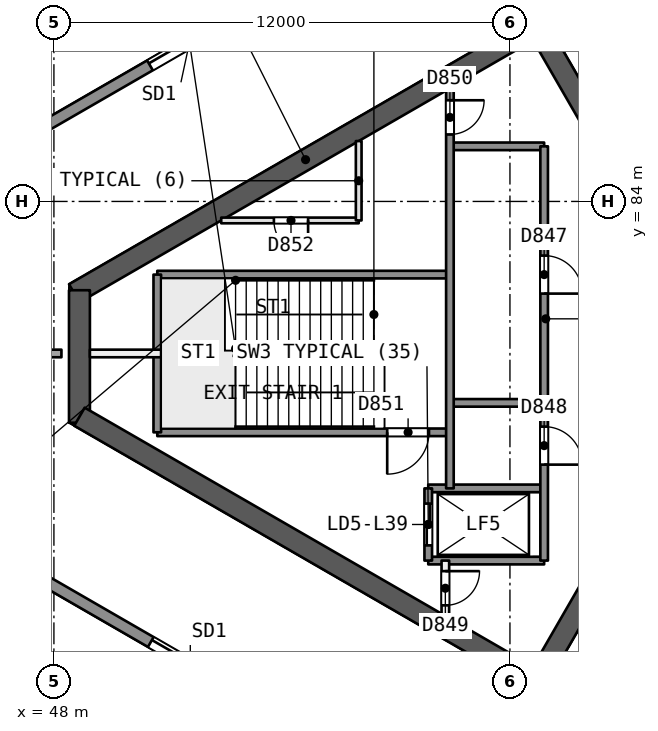
"""IFC4 building model, lengths in metres.
Left out: names, types, materials, properties, quantities, classifications, styles, units other than length and angle.
Written with IfcOpenShell. Run it as: python <this file> out.ifc"""

import sys

from ifc_helpers import new_model, si_unit, direction, frame, frame_2d, origin, place, context, subcontext, project, spatial, rectangle, extrude, element, fill, save


model = new_model("IFC4")
c1 = context("Model", 3, precision=1e-05, world=origin(), true_north=direction((0.0, 1.0)))
c2 = subcontext(c1, "Body", "Model", "MODEL_VIEW")
j1 = project(units=[si_unit("LENGTHUNIT", "METRE"), si_unit("PLANEANGLEUNIT", "RADIAN")], contexts=[c1])
p1 = place(None, origin())
s1 = spatial("IfcSite", under=j1, at=p1, CompositionType="ELEMENT")
p2 = place(p1, origin())
s2 = spatial("IfcBuilding", under=s1, at=p2, CompositionType="ELEMENT")
p3 = place(p2, frame((0.0, 0.0, 163.7)))
s3 = spatial("IfcBuildingStorey", under=s2, at=p3, CompositionType="ELEMENT", Elevation=163.7)
p4 = place(p3, frame((65.682, 80.0, 0.0), z_axis=(0.0, 0.0, 1.0), x_axis=(-0.500000202252, 0.866025287014, 0.0)))
e1 = element("IfcWall", 1, at=p4, inside=s3, PredefinedType="SHEAR", context=c2, shape_type="SweptSolid", body=[
    extrude(rectangle(XDim=10.221, YDim=0.55, at=frame_2d((5.111, 0.0))), origin(), (0.0, 0.0, 1.0), 3.7),
])
p5 = place(p4, frame((0.791, 0.0, 0.0)))
e2 = element("IfcOpeningElement", 2, at=p5, cuts=e1, PredefinedType="OPENING", context=c2, shape_type="SweptSolid", body=[
    extrude(rectangle(XDim=1.2, YDim=2.1, at=frame_2d((0.6, 1.05))), frame((0.0, 0.286, 0.0), z_axis=(0.0, -1.0, 0.0), x_axis=(1.0, 0.0, 0.0)), (0.0, 0.0, 1.0), 0.571),
])
p6 = place(p3, frame((60.709, 88.614, 0.0), z_axis=(0.0, 0.0, 1.0), x_axis=(-0.866020164116, -0.500009075263, 0.0)))
e3 = element("IfcWall", 3, at=p6, inside=s3, PredefinedType="SHEAR", context=c2, shape_type="SweptSolid", body=[
    extrude(rectangle(XDim=14.058, YDim=0.55, at=frame_2d((7.029, 0.0))), origin(), (0.0, 0.0, 1.0), 3.7),
])
p7 = place(p3, frame((48.672, 81.664, 0.0), z_axis=(0.0, 0.0, 1.0), x_axis=(0.0, -1.0, 0.0)))
e4 = element("IfcWall", 4, at=p7, inside=s3, PredefinedType="SHEAR", context=c2, shape_type="SweptSolid", body=[
    extrude(rectangle(XDim=3.487, YDim=0.55, at=frame_2d((1.743, 0.0))), origin(), (0.0, 0.0, 1.0), 3.7),
])
p8 = place(p3, frame((48.672, 78.336, 0.0), z_axis=(0.0, 0.0, 1.0), x_axis=(0.866023530946, -0.500003243837, 0.0)))
e5 = element("IfcWall", 5, at=p8, inside=s3, PredefinedType="SHEAR", context=c2, shape_type="SweptSolid", body=[
    extrude(rectangle(XDim=14.175, YDim=0.55, at=frame_2d((7.087, 0.0))), origin(), (0.0, 0.0, 1.0), 3.7),
])
p9 = place(p3, frame((60.709, 71.386, 0.0), z_axis=(0.0, 0.0, 1.0), x_axis=(0.500015938302, 0.866016201606, 0.0)))
e6 = element("IfcWall", 6, at=p9, inside=s3, PredefinedType="SHEAR", context=c2, shape_type="SweptSolid", body=[
    extrude(rectangle(XDim=10.105, YDim=0.55, at=frame_2d((5.053, 0.0))), origin(), (0.0, 0.0, 1.0), 3.7),
])
p10 = place(p9, frame((7.955, 0.0, 0.0)))
e7 = element("IfcOpeningElement", 7, at=p10, cuts=e6, PredefinedType="OPENING", context=c2, shape_type="SweptSolid", body=[
    extrude(rectangle(XDim=1.2, YDim=2.1, at=frame_2d((0.6, 1.05))), frame((0.0, 0.286, 0.0), z_axis=(0.0, -1.0, 0.0), x_axis=(1.0, 0.0, 0.0)), (0.0, 0.0, 1.0), 0.571),
])
p11 = place(p3, frame((66.129, 83.077, 0.0), z_axis=(0.0, 0.0, 1.0), x_axis=(-0.5000018851, 0.866024315419, 0.0)))
e8 = element("IfcWall", 8, at=p11, inside=s3, PredefinedType="PARTITIONING", context=c2, shape_type="SweptSolid", body=[
    extrude(rectangle(XDim=9.0, YDim=0.2, at=frame_2d((4.5, 0.0))), origin(), (0.0, 0.0, 1.0), 3.25),
])
p12 = place(p3, frame((42.338, 80.0, 0.0), z_axis=(0.0, 0.0, 1.0), x_axis=(1.0, 0.0, 0.0)))
e9 = element("IfcWall", 9, at=p12, inside=s3, PredefinedType="PARTITIONING", context=c2, shape_type="SweptSolid", body=[
    extrude(rectangle(XDim=5.86, YDim=0.2, at=frame_2d((2.93, 0.0))), origin(), (0.0, 0.0, 1.0), 3.25),
])
p13 = place(p3, frame((42.189, 82.766, 0.0), z_axis=(0.0, 0.0, 1.0), x_axis=(0.866025862562, 0.499999205373, 0.0)))
e10 = element("IfcWall", 10, at=p13, inside=s3, PredefinedType="SOLIDWALL", context=c2, shape_type="SweptSolid", body=[
    extrude(rectangle(XDim=54.064, YDim=0.3, at=frame_2d((27.032, 0.0))), origin(), (0.0, 0.0, 1.0), 3.25),
])
p14 = place(p13, frame((20.688, 0.0, 0.0)))
e11 = element("IfcOpeningElement", 11, at=p14, cuts=e10, PredefinedType="OPENING", context=c2, shape_type="SweptSolid", body=[
    extrude(rectangle(XDim=2.4, YDim=2.4, at=frame_2d((1.2, 1.2))), frame((0.0, 0.161, 0.0), z_axis=(0.0, -1.0, 0.0), x_axis=(1.0, 0.0, 0.0)), (0.0, 0.0, 1.0), 0.321),
])
p15 = place(p13, frame((9.629, 0.0, 0.0)))
e12 = element("IfcOpeningElement", 12, at=p15, cuts=e10, PredefinedType="OPENING", context=c2, shape_type="SweptSolid", body=[
    extrude(rectangle(XDim=2.4, YDim=2.4, at=frame_2d((1.2, 1.2))), frame((0.0, 0.161, 0.0), z_axis=(0.0, -1.0, 0.0), x_axis=(1.0, 0.0, 0.0)), (0.0, 0.0, 1.0), 0.321),
])
p16 = place(p13, frame((40.951, 0.0, 0.0)))
e13 = element("IfcOpeningElement", 13, at=p16, cuts=e10, PredefinedType="OPENING", context=c2, shape_type="SweptSolid", body=[
    extrude(rectangle(XDim=2.4, YDim=2.4, at=frame_2d((1.2, 1.2))), frame((0.0, 0.161, 0.0), z_axis=(0.0, -1.0, 0.0), x_axis=(1.0, 0.0, 0.0)), (0.0, 0.0, 1.0), 0.321),
])
p17 = place(p13, frame((27.847, 0.0, 0.9)))
e14 = element("IfcOpeningElement", 14, at=p17, cuts=e10, PredefinedType="OPENING", context=c2, shape_type="SweptSolid", body=[
    extrude(rectangle(XDim=1.8, YDim=1.5, at=frame_2d((0.9, 0.75))), frame((0.0, 0.161, 0.0), z_axis=(0.0, -1.0, 0.0), x_axis=(1.0, 0.0, 0.0)), (0.0, 0.0, 1.0), 0.321),
])
p18 = place(p13, frame((25.041, 0.0, 0.9)))
e15 = element("IfcOpeningElement", 15, at=p18, cuts=e10, PredefinedType="OPENING", context=c2, shape_type="SweptSolid", body=[
    extrude(rectangle(XDim=1.8, YDim=1.5, at=frame_2d((0.9, 0.75))), frame((0.0, 0.161, 0.0), z_axis=(0.0, -1.0, 0.0), x_axis=(1.0, 0.0, 0.0)), (0.0, 0.0, 1.0), 0.321),
])
p19 = place(p3, frame((89.01, 50.202, 0.0), z_axis=(0.0, 0.0, 1.0), x_axis=(-0.866025862562, 0.499999205373, 0.0)))
e16 = element("IfcWall", 16, at=p19, inside=s3, PredefinedType="SOLIDWALL", context=c2, shape_type="SweptSolid", body=[
    extrude(rectangle(XDim=54.064, YDim=0.3, at=frame_2d((27.032, 0.0))), origin(), (0.0, 0.0, 1.0), 3.25),
])
p20 = place(p19, frame((30.665, 0.0, 0.0)))
e17 = element("IfcOpeningElement", 17, at=p20, cuts=e16, PredefinedType="OPENING", context=c2, shape_type="SweptSolid", body=[
    extrude(rectangle(XDim=2.4, YDim=2.4, at=frame_2d((1.2, 1.2))), frame((0.0, 0.161, 0.0), z_axis=(0.0, -1.0, 0.0), x_axis=(1.0, 0.0, 0.0)), (0.0, 0.0, 1.0), 0.321),
])
p21 = place(p19, frame((42.011, 0.0, 0.0)))
e18 = element("IfcOpeningElement", 18, at=p21, cuts=e16, PredefinedType="OPENING", context=c2, shape_type="SweptSolid", body=[
    extrude(rectangle(XDim=2.4, YDim=2.4, at=frame_2d((1.2, 1.2))), frame((0.0, 0.161, 0.0), z_axis=(0.0, -1.0, 0.0), x_axis=(1.0, 0.0, 0.0)), (0.0, 0.0, 1.0), 0.321),
])
p22 = place(p19, frame((10.402, 0.0, 0.0)))
e19 = element("IfcOpeningElement", 19, at=p22, cuts=e16, PredefinedType="OPENING", context=c2, shape_type="SweptSolid", body=[
    extrude(rectangle(XDim=2.4, YDim=2.4, at=frame_2d((1.2, 1.2))), frame((0.0, 0.161, 0.0), z_axis=(0.0, -1.0, 0.0), x_axis=(1.0, 0.0, 0.0)), (0.0, 0.0, 1.0), 0.321),
])
p23 = place(p19, frame((25.197, 0.0, 0.9)))
e20 = element("IfcOpeningElement", 20, at=p23, cuts=e16, PredefinedType="OPENING", context=c2, shape_type="SweptSolid", body=[
    extrude(rectangle(XDim=1.8, YDim=1.5, at=frame_2d((0.9, 0.75))), frame((0.0, 0.161, 0.0), z_axis=(0.0, -1.0, 0.0), x_axis=(1.0, 0.0, 0.0)), (0.0, 0.0, 1.0), 0.321),
])
p24 = place(p3, frame((60.9, 85.45, 0.0), z_axis=(0.0, 0.0, 1.0), x_axis=(-1.0, 0.0, 0.0)))
e21 = element("IfcWall", 21, at=p24, inside=s3, PredefinedType="SOLIDWALL", context=c2, shape_type="SweptSolid", body=[
    extrude(rectangle(XDim=2.48, YDim=0.2, at=frame_2d((1.24, 0.0))), origin(), (0.0, 0.0, 1.0), 3.25),
])
p25 = place(p3, frame((56.02, 83.5, 0.0), z_axis=(0.0, 0.0, 1.0), x_axis=(-1.0, 0.0, 0.0)))
e22 = element("IfcWall", 22, at=p25, inside=s3, PredefinedType="PARTITIONING", context=c2, shape_type="SweptSolid", body=[
    extrude(rectangle(XDim=3.618, YDim=0.15, at=frame_2d((1.809, 0.0))), origin(), (0.0, 0.0, 1.0), 3.25),
])
p26 = place(p25, frame((1.332, 0.0, 0.0)))
e23 = element("IfcOpeningElement", 23, at=p26, cuts=e22, PredefinedType="OPENING", context=c2, shape_type="SweptSolid", body=[
    extrude(rectangle(XDim=0.9, YDim=2.1, at=frame_2d((0.45, 1.05))), frame((0.0, 0.085, 0.0), z_axis=(0.0, -1.0, 0.0), x_axis=(1.0, 0.0, 0.0)), (0.0, 0.0, 1.0), 0.171),
])
p27 = place(p3, frame((58.42, 82.075, 0.0), z_axis=(0.0, 0.0, 1.0), x_axis=(-1.0, 0.0, 0.0)))
e24 = element("IfcWall", 24, at=p27, inside=s3, PredefinedType="SOLIDWALL", context=c2, shape_type="SweptSolid", body=[
    extrude(rectangle(XDim=7.7, YDim=0.2, at=frame_2d((3.85, 0.0))), origin(), (0.0, 0.0, 1.0), 3.25),
])
p28 = place(p3, frame((50.82, 80.0, 0.0), z_axis=(0.0, 0.0, 1.0), x_axis=(-1.0, 0.0, 0.0)))
e25 = element("IfcWall", 25, at=p28, inside=s3, PredefinedType="PARTITIONING", context=c2, shape_type="SweptSolid", body=[
    extrude(rectangle(XDim=1.873, YDim=0.2, at=frame_2d((0.937, 0.0))), origin(), (0.0, 0.0, 1.0), 3.25),
])
p29 = place(p3, frame((60.9, 78.7, 0.0), z_axis=(0.0, 0.0, 1.0), x_axis=(-1.0, 0.0, 0.0)))
e26 = element("IfcWall", 26, at=p29, inside=s3, PredefinedType="SOLIDWALL", context=c2, shape_type="SweptSolid", body=[
    extrude(rectangle(XDim=2.48, YDim=0.2, at=frame_2d((1.24, 0.0))), origin(), (0.0, 0.0, 1.0), 3.25),
])
p30 = place(p3, frame((58.42, 77.925, 0.0), z_axis=(0.0, 0.0, 1.0), x_axis=(-1.0, 0.0, 0.0)))
e27 = element("IfcWall", 27, at=p30, inside=s3, PredefinedType="SOLIDWALL", context=c2, shape_type="SweptSolid", body=[
    extrude(rectangle(XDim=7.7, YDim=0.2, at=frame_2d((3.85, 0.0))), origin(), (0.0, 0.0, 1.0), 3.25),
])
p31 = place(p30, frame((0.55, 0.0, 0.0)))
e28 = element("IfcOpeningElement", 28, at=p31, cuts=e27, PredefinedType="OPENING", context=c2, shape_type="SweptSolid", body=[
    extrude(rectangle(XDim=1.1, YDim=2.1, at=frame_2d((0.55, 1.05))), frame((0.0, 0.11, 0.0), z_axis=(0.0, -1.0, 0.0), x_axis=(1.0, 0.0, 0.0)), (0.0, 0.0, 1.0), 0.221),
])
for number, where, z_axis, x_axis in (
    (29, (60.9, 76.45, 0.0), (0.0, 0.0, 1.0), (-1.0, 0.0, 0.0)),
    (30, (60.9, 74.55, 0.0), (0.0, 0.0, 1.0), (-1.0, 0.0, 0.0)),
):
    element("IfcWall", number, at=place(p3, frame(where, z_axis=z_axis, x_axis=x_axis)), inside=s3, PredefinedType="SOLIDWALL", context=c2, shape_type="SweptSolid", body=[
        extrude(rectangle(XDim=3.05, YDim=0.2, at=frame_2d((1.525, 0.0))), origin(), (0.0, 0.0, 1.0), 3.25),
    ])
p32 = place(p3, frame((60.9, 85.45, 0.0), z_axis=(0.0, 0.0, 1.0), x_axis=(0.0, -1.0, 0.0)))
e31 = element("IfcWall", 31, at=p32, inside=s3, PredefinedType="SOLIDWALL", context=c2, shape_type="SweptSolid", body=[
    extrude(rectangle(XDim=10.9, YDim=0.2, at=frame_2d((5.45, 0.0))), origin(), (0.0, 0.0, 1.0), 3.25),
])
p33 = place(p32, frame((2.875, 0.0, 0.0)))
e32 = element("IfcOpeningElement", 32, at=p33, cuts=e31, PredefinedType="OPENING", context=c2, shape_type="SweptSolid", body=[
    extrude(rectangle(XDim=1.0, YDim=2.1, at=frame_2d((0.5, 1.05))), frame((0.0, 0.11, 0.0), z_axis=(0.0, -1.0, 0.0), x_axis=(1.0, 0.0, 0.0)), (0.0, 0.0, 1.0), 0.221),
])
p34 = place(p32, frame((7.375, 0.0, 0.0)))
e33 = element("IfcOpeningElement", 33, at=p34, cuts=e31, PredefinedType="OPENING", context=c2, shape_type="SweptSolid", body=[
    extrude(rectangle(XDim=1.0, YDim=2.1, at=frame_2d((0.5, 1.05))), frame((0.0, 0.11, 0.0), z_axis=(0.0, -1.0, 0.0), x_axis=(1.0, 0.0, 0.0)), (0.0, 0.0, 1.0), 0.221),
])
p35 = place(p3, frame((58.42, 86.974, 0.0), z_axis=(0.0, 0.0, 1.0), x_axis=(0.0, -1.0, 0.0)))
e34 = element("IfcWall", 34, at=p35, inside=s3, PredefinedType="SOLIDWALL", context=c2, shape_type="SweptSolid", body=[
    extrude(rectangle(XDim=10.524, YDim=0.2, at=frame_2d((5.262, 0.0))), origin(), (0.0, 0.0, 1.0), 3.25),
])
p36 = place(p35, frame((0.312, 0.0, 0.0)))
e35 = element("IfcOpeningElement", 35, at=p36, cuts=e34, PredefinedType="OPENING", context=c2, shape_type="SweptSolid", body=[
    extrude(rectangle(XDim=0.9, YDim=2.1, at=frame_2d((0.45, 1.05))), frame((0.0, 0.11, 0.0), z_axis=(0.0, -1.0, 0.0), x_axis=(1.0, 0.0, 0.0)), (0.0, 0.0, 1.0), 0.221),
])
p37 = place(p3, frame((58.3, 74.55, 0.0), z_axis=(0.0, 0.0, 1.0), x_axis=(0.0, -1.0, 0.0)))
e36 = element("IfcWall", 36, at=p37, inside=s3, PredefinedType="PARTITIONING", context=c2, shape_type="SweptSolid", body=[
    extrude(rectangle(XDim=1.455, YDim=0.2, at=frame_2d((0.728, 0.0))), origin(), (0.0, 0.0, 1.0), 3.25),
])
p38 = place(p37, frame((0.278, 0.0, 0.0)))
e37 = element("IfcOpeningElement", 37, at=p38, cuts=e36, PredefinedType="OPENING", context=c2, shape_type="SweptSolid", body=[
    extrude(rectangle(XDim=0.9, YDim=2.1, at=frame_2d((0.45, 1.05))), frame((0.0, 0.11, 0.0), z_axis=(0.0, -1.0, 0.0), x_axis=(1.0, 0.0, 0.0)), (0.0, 0.0, 1.0), 0.221),
])
p39 = place(p3, frame((57.85, 76.45, 0.0), z_axis=(0.0, 0.0, 1.0), x_axis=(0.0, -1.0, 0.0)))
e38 = element("IfcWall", 38, at=p39, inside=s3, PredefinedType="SOLIDWALL", context=c2, shape_type="SweptSolid", body=[
    extrude(rectangle(XDim=1.9, YDim=0.2, at=frame_2d((0.95, 0.0))), origin(), (0.0, 0.0, 1.0), 3.25),
])
p40 = place(p39, frame((0.4, 0.0, 0.0)))
e39 = element("IfcOpeningElement", 39, at=p40, cuts=e38, PredefinedType="OPENING", context=c2, shape_type="SweptSolid", body=[
    extrude(rectangle(XDim=1.1, YDim=2.1, at=frame_2d((0.55, 1.05))), frame((0.0, 0.11, 0.0), z_axis=(0.0, -1.0, 0.0), x_axis=(1.0, 0.0, 0.0)), (0.0, 0.0, 1.0), 0.221),
])
p41 = place(p3, frame((56.02, 85.589, 0.0), z_axis=(0.0, 0.0, 1.0), x_axis=(0.0, -1.0, 0.0)))
e40 = element("IfcWall", 40, at=p41, inside=s3, PredefinedType="PARTITIONING", context=c2, shape_type="SweptSolid", body=[
    extrude(rectangle(XDim=2.089, YDim=0.15, at=frame_2d((1.044, 0.0))), origin(), (0.0, 0.0, 1.0), 3.25),
])
p42 = place(p3, frame((50.72, 82.075, 0.0), z_axis=(0.0, 0.0, 1.0), x_axis=(0.0, -1.0, 0.0)))
e41 = element("IfcWall", 41, at=p42, inside=s3, PredefinedType="SOLIDWALL", context=c2, shape_type="SweptSolid", body=[
    extrude(rectangle(XDim=4.15, YDim=0.2, at=frame_2d((2.075, 0.0))), origin(), (0.0, 0.0, 1.0), 3.25),
])
p43 = place(p15, origin())
e42 = element("IfcDoor", 42, at=p43, inside=s3, OperationType="SLIDING_TO_RIGHT", PredefinedType="NOTDEFINED", context=c2, shape_type="SweptSolid", body=[
    extrude(rectangle(XDim=2.4, YDim=2.4, at=frame_2d((1.2, 1.2))), frame((0.0, 0.025, 0.0), z_axis=(0.0, -1.0, 0.0), x_axis=(1.0, 0.0, 0.0)), (0.0, 0.0, 1.0), 0.05),
])
fill(e12, e42)
p44 = place(p21, origin())
e43 = element("IfcDoor", 43, at=p44, inside=s3, OperationType="SLIDING_TO_RIGHT", PredefinedType="NOTDEFINED", context=c2, shape_type="SweptSolid", body=[
    extrude(rectangle(XDim=2.4, YDim=2.4, at=frame_2d((1.2, 1.2))), frame((0.0, 0.025, 0.0), z_axis=(0.0, -1.0, 0.0), x_axis=(1.0, 0.0, 0.0)), (0.0, 0.0, 1.0), 0.05),
])
fill(e18, e43)
p45 = place(p40, origin())
e44 = element("IfcDoor", 44, at=p45, inside=s3, OperationType="SLIDING_TO_RIGHT", PredefinedType="NOTDEFINED", context=c2, shape_type="SweptSolid", body=[
    extrude(rectangle(XDim=1.1, YDim=2.1, at=frame_2d((0.55, 1.05))), frame((0.0, 0.025, 0.0), z_axis=(0.0, -1.0, 0.0), x_axis=(1.0, 0.0, 0.0)), (0.0, 0.0, 1.0), 0.05),
])
fill(e39, e44)
p46 = place(p33, origin())
e45 = element("IfcDoor", 45, at=p46, inside=s3, OperationType="SINGLE_SWING_RIGHT", PredefinedType="NOTDEFINED", context=c2, shape_type="SweptSolid", body=[
    extrude(rectangle(XDim=1.0, YDim=2.1, at=frame_2d((0.5, 1.05))), frame((0.0, 0.025, 0.0), z_axis=(0.0, -1.0, 0.0), x_axis=(1.0, 0.0, 0.0)), (0.0, 0.0, 1.0), 0.05),
])
fill(e32, e45)
p47 = place(p34, origin())
e46 = element("IfcDoor", 46, at=p47, inside=s3, OperationType="SINGLE_SWING_RIGHT", PredefinedType="NOTDEFINED", context=c2, shape_type="SweptSolid", body=[
    extrude(rectangle(XDim=1.0, YDim=2.1, at=frame_2d((0.5, 1.05))), frame((0.0, 0.025, 0.0), z_axis=(0.0, -1.0, 0.0), x_axis=(1.0, 0.0, 0.0)), (0.0, 0.0, 1.0), 0.05),
])
fill(e33, e46)
p48 = place(p38, origin())
e47 = element("IfcDoor", 47, at=p48, inside=s3, OperationType="SINGLE_SWING_LEFT", PredefinedType="NOTDEFINED", context=c2, shape_type="SweptSolid", body=[
    extrude(rectangle(XDim=0.9, YDim=2.1, at=frame_2d((0.45, 1.05))), frame((0.0, 0.025, 0.0), z_axis=(0.0, -1.0, 0.0), x_axis=(1.0, 0.0, 0.0)), (0.0, 0.0, 1.0), 0.05),
])
fill(e37, e47)
p49 = place(p36, origin())
e48 = element("IfcDoor", 48, at=p49, inside=s3, OperationType="SINGLE_SWING_LEFT", PredefinedType="NOTDEFINED", context=c2, shape_type="SweptSolid", body=[
    extrude(rectangle(XDim=0.9, YDim=2.1, at=frame_2d((0.45, 1.05))), frame((0.0, 0.025, 0.0), z_axis=(0.0, -1.0, 0.0), x_axis=(1.0, 0.0, 0.0)), (0.0, 0.0, 1.0), 0.05),
])
fill(e35, e48)
p50 = place(p31, origin())
e49 = element("IfcDoor", 49, at=p50, inside=s3, OperationType="SINGLE_SWING_RIGHT", PredefinedType="NOTDEFINED", context=c2, shape_type="SweptSolid", body=[
    extrude(rectangle(XDim=1.1, YDim=2.1, at=frame_2d((0.55, 1.05))), frame((0.0, 0.025, 0.0), z_axis=(0.0, -1.0, 0.0), x_axis=(1.0, 0.0, 0.0)), (0.0, 0.0, 1.0), 0.05),
])
fill(e28, e49)
p51 = place(p26, origin())
e50 = element("IfcDoor", 50, at=p51, inside=s3, OperationType="SINGLE_SWING_LEFT", PredefinedType="NOTDEFINED", context=c2, shape_type="SweptSolid", body=[
    extrude(rectangle(XDim=0.9, YDim=2.1, at=frame_2d((0.45, 1.05))), frame((0.0, 0.025, 0.0), z_axis=(0.0, -1.0, 0.0), x_axis=(1.0, 0.0, 0.0)), (0.0, 0.0, 1.0), 0.05),
])
fill(e23, e50)
save(model, sys.argv[1])
